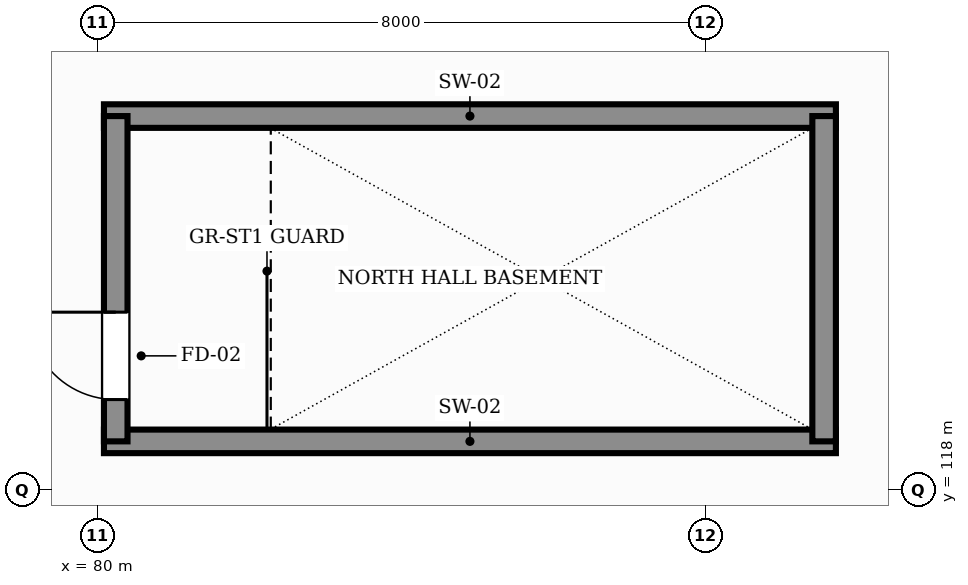
"""IFC4 building model, lengths in metres.
Left out: names, types, materials, properties, quantities, classifications, styles, units other than length and angle.
Written with IfcOpenShell. Run it as: python <this file> out.ifc"""

import sys

from ifc_helpers import new_model, si_unit, direction, frame, frame_2d, origin, place, context, subcontext, project, spatial, rectangle, extrude, element, fill, save


model = new_model("IFC4")
c1 = context("Model", 3, precision=1e-05, world=origin(), true_north=direction((0.0, 1.0)))
c2 = subcontext(c1, "Body", "Model", "MODEL_VIEW")
j1 = project(units=[si_unit("LENGTHUNIT", "METRE"), si_unit("PLANEANGLEUNIT", "RADIAN")], contexts=[c1])
p1 = place(None, origin())
s1 = spatial("IfcSite", under=j1, at=p1, CompositionType="ELEMENT")
p2 = place(p1, origin())
s2 = spatial("IfcBuilding", under=s1, at=p2, CompositionType="ELEMENT")
p3 = place(p2, origin())
s3 = spatial("IfcBuildingStorey", under=s2, at=p3, CompositionType="ELEMENT", Elevation=0.0)
for number, where, z_axis, x_axis in (
    (1, (80.085, 118.64, 0.0), (0.0, 0.0, 1.0), (1.0, 0.0, 0.0)),
    (2, (80.085, 122.92, 0.0), (0.0, 0.0, 1.0), (1.0, 0.0, 0.0)),
):
    element("IfcWall", number, at=place(p3, frame(where, z_axis=z_axis, x_axis=x_axis)), inside=s3, PredefinedType="SHEAR", context=c2, shape_type="SweptSolid", body=[
        extrude(rectangle(XDim=9.63, YDim=0.31, at=frame_2d((4.815, 0.0))), origin(), (0.0, 0.0, 1.0), 6.0),
    ])
p4 = place(p3, frame((80.24, 118.64, 0.0), z_axis=(0.0, 0.0, 1.0), x_axis=(0.0, 1.0, 0.0)))
e3 = element("IfcWall", 3, at=p4, inside=s3, PredefinedType="SHEAR", context=c2, shape_type="SweptSolid", body=[
    extrude(rectangle(XDim=4.28, YDim=0.31, at=frame_2d((2.14, 0.0))), origin(), (0.0, 0.0, 1.0), 6.0),
])
p5 = place(p4, frame((0.55, 0.0, 0.0)))
e4 = element("IfcOpeningElement", 4, at=p5, cuts=e3, PredefinedType="OPENING", context=c2, shape_type="SweptSolid", body=[
    extrude(rectangle(XDim=1.15, YDim=2.2, at=frame_2d((0.575, 1.1))), frame((0.0, 0.165, 0.0), z_axis=(0.0, -1.0, 0.0), x_axis=(1.0, 0.0, 0.0)), (0.0, 0.0, 1.0), 0.33),
])
p6 = place(p3, frame((89.56, 118.64, 0.0), z_axis=(0.0, 0.0, 1.0), x_axis=(0.0, 1.0, 0.0)))
e5 = element("IfcWall", 5, at=p6, inside=s3, PredefinedType="SHEAR", context=c2, shape_type="SweptSolid", body=[
    extrude(rectangle(XDim=4.28, YDim=0.31, at=frame_2d((2.14, 0.0))), origin(), (0.0, 0.0, 1.0), 6.0),
])
p7 = place(p5, origin())
e6 = element("IfcDoor", 6, at=p7, inside=s3, OperationType="SINGLE_SWING_RIGHT", PredefinedType="DOOR", context=c2, shape_type="SweptSolid", body=[
    extrude(rectangle(XDim=1.15, YDim=2.2, at=frame_2d((0.575, 1.1))), frame((0.0, 0.025, 0.0), z_axis=(0.0, -1.0, 0.0), x_axis=(1.0, 0.0, 0.0)), (0.0, 0.0, 1.0), 0.05),
])
fill(e4, e6)
save(model, sys.argv[1])
